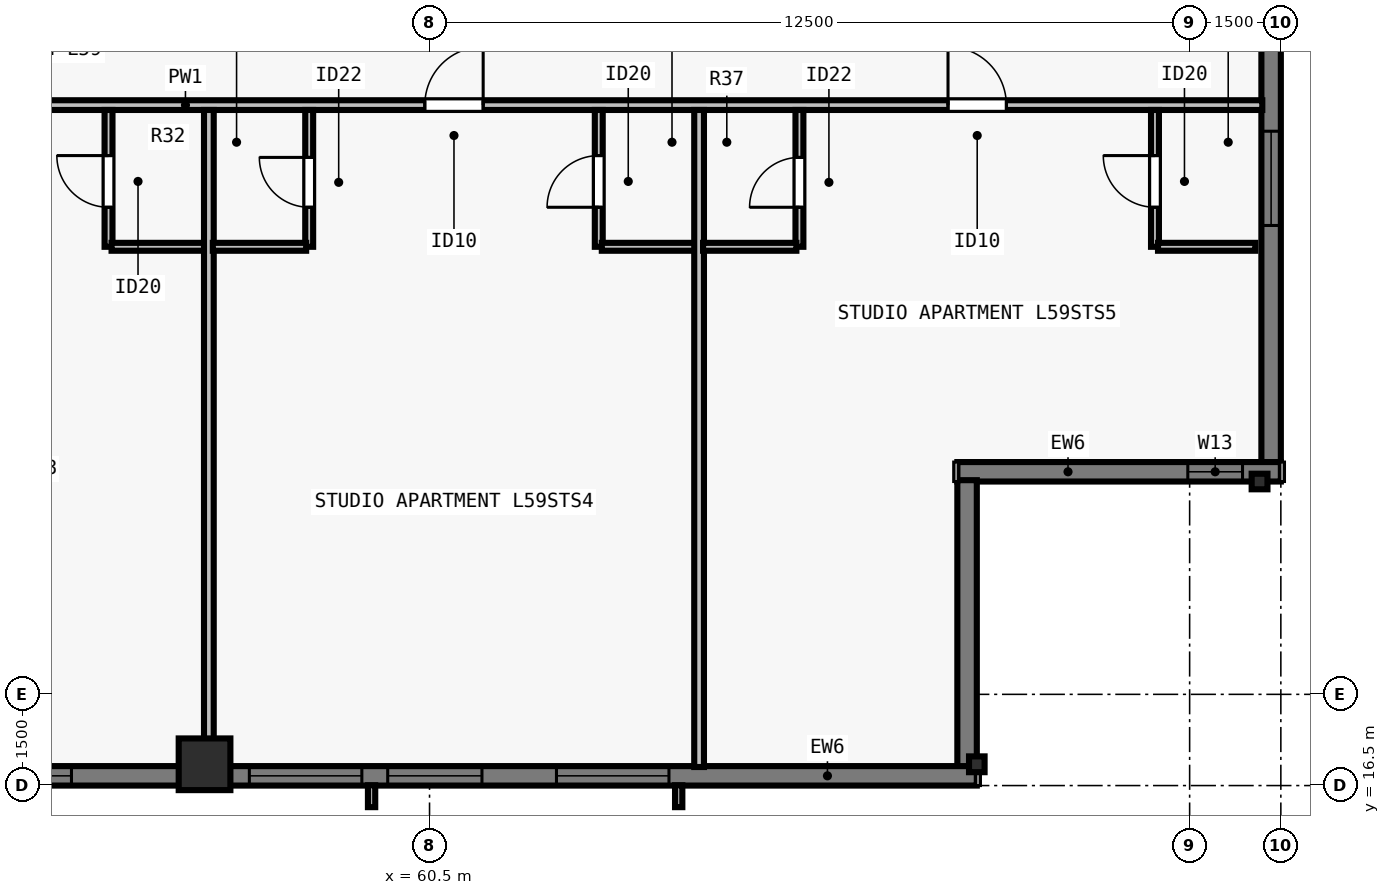
"""IFC4 building model, lengths in metres.
Left out: names, types, materials, properties, quantities, classifications, styles, units other than length and angle.
Written with IfcOpenShell. Run it as: python <this file> out.ifc"""

import sys

from ifc_helpers import new_model, si_unit, direction, frame, frame_2d, origin, origin_2d, place, context, subcontext, project, spatial, rectangle, i_section, extrude, element, fill, save


model = new_model("IFC4")
c1 = context("Model", 3, precision=1e-05, world=origin(), true_north=direction((0.0, 1.0)))
c2 = subcontext(c1, "Body", "Model", "MODEL_VIEW")
j1 = project(units=[si_unit("LENGTHUNIT", "METRE"), si_unit("PLANEANGLEUNIT", "RADIAN")], contexts=[c1])
p1 = place(None, origin())
s1 = spatial("IfcSite", under=j1, at=p1, CompositionType="ELEMENT")
p2 = place(p1, origin())
s2 = spatial("IfcBuilding", under=s1, at=p2, CompositionType="ELEMENT")
p3 = place(p2, frame((0.0, 0.0, 216.5)))
s3 = spatial("IfcBuildingStorey", under=s2, at=p3, CompositionType="ELEMENT", Elevation=216.5)
p4 = place(p3, frame((56.8, 16.85, 0.0), z_axis=(0.0, 0.0, 1.0), x_axis=(1.0, 0.0, 0.0)))
e1 = element("IfcColumn", 1, at=p4, inside=s3, PredefinedType="COLUMN", context=c2, shape_type="SweptSolid", body=[
    extrude(rectangle(XDim=0.85, YDim=0.85, at=origin_2d()), origin(), (0.0, 0.0, 1.0), 3.5),
])
for number, where, z_axis, x_axis in (
    (2, (69.5, 16.85, 0.0), (0.0, 0.0, 1.0), (1.0, 0.0, 0.0)),
    (3, (74.15, 21.5, 0.0), (0.0, 0.0, 1.0), (0.0, 1.0, 0.0)),
):
    element("IfcColumn", number, at=place(p3, frame(where, z_axis=z_axis, x_axis=x_axis)), inside=s3, PredefinedType="COLUMN", context=c2, shape_type="SweptSolid", body=[
        extrude(i_section(OverallWidth=0.256, OverallDepth=0.26, WebThickness=0.01, FlangeThickness=0.017, FilletRadius=0.013, at=origin_2d()), origin(), (0.0, 0.0, 1.0), 3.5),
    ])
p5 = place(p3, frame((74.34, 56.5, 0.0), z_axis=(0.0, 0.0, 1.0), x_axis=(0.0, -1.0, 0.0)))
e4 = element("IfcWall", 4, at=p5, inside=s3, PredefinedType="SOLIDWALL", context=c2, shape_type="SweptSolid", body=[
    extrude(rectangle(XDim=34.702, YDim=0.32, at=frame_2d((17.351, 0.0))), origin(), (0.0, 0.0, 1.0), 3.29),
])
p6 = place(p5, frame((6.888, 0.0, 0.8)))
e5 = element("IfcOpeningElement", 5, at=p6, cuts=e4, PredefinedType="OPENING", context=c2, shape_type="SweptSolid", body=[
    extrude(rectangle(XDim=1.55, YDim=1.678, at=frame_2d((0.775, 0.839))), frame((0.0, 0.17, 0.0), z_axis=(0.0, -1.0, 0.0), x_axis=(1.0, 0.0, 0.0)), (0.0, 0.0, 1.0), 0.34),
])
p7 = place(p5, frame((10.113, 0.0, 0.8)))
e6 = element("IfcOpeningElement", 6, at=p7, cuts=e4, PredefinedType="OPENING", context=c2, shape_type="SweptSolid", body=[
    extrude(rectangle(XDim=1.85, YDim=1.678, at=frame_2d((0.925, 0.839))), frame((0.0, 0.17, 0.0), z_axis=(0.0, -1.0, 0.0), x_axis=(1.0, 0.0, 0.0)), (0.0, 0.0, 1.0), 0.34),
])
p8 = place(p5, frame((14.038, 0.0, 0.8)))
e7 = element("IfcOpeningElement", 7, at=p8, cuts=e4, PredefinedType="OPENING", context=c2, shape_type="SweptSolid", body=[
    extrude(rectangle(XDim=1.55, YDim=1.678, at=frame_2d((0.775, 0.839))), frame((0.0, 0.17, 0.0), z_axis=(0.0, -1.0, 0.0), x_axis=(1.0, 0.0, 0.0)), (0.0, 0.0, 1.0), 0.34),
])
p9 = place(p5, frame((18.114, 0.0, 0.8)))
e8 = element("IfcOpeningElement", 8, at=p9, cuts=e4, PredefinedType="OPENING", context=c2, shape_type="SweptSolid", body=[
    extrude(rectangle(XDim=1.85, YDim=1.678, at=frame_2d((0.925, 0.839))), frame((0.0, 0.17, 0.0), z_axis=(0.0, -1.0, 0.0), x_axis=(1.0, 0.0, 0.0)), (0.0, 0.0, 1.0), 0.34),
])
p10 = place(p5, frame((23.614, 0.0, 0.8)))
e9 = element("IfcOpeningElement", 9, at=p10, cuts=e4, PredefinedType="OPENING", context=c2, shape_type="SweptSolid", body=[
    extrude(rectangle(XDim=1.85, YDim=1.678, at=frame_2d((0.925, 0.839))), frame((0.0, 0.17, 0.0), z_axis=(0.0, -1.0, 0.0), x_axis=(1.0, 0.0, 0.0)), (0.0, 0.0, 1.0), 0.34),
])
p11 = place(p5, frame((29.24, 0.0, 0.8)))
e10 = element("IfcOpeningElement", 10, at=p11, cuts=e4, PredefinedType="OPENING", context=c2, shape_type="SweptSolid", body=[
    extrude(rectangle(XDim=1.55, YDim=1.678, at=frame_2d((0.775, 0.839))), frame((0.0, 0.17, 0.0), z_axis=(0.0, -1.0, 0.0), x_axis=(1.0, 0.0, 0.0)), (0.0, 0.0, 1.0), 0.34),
])
p12 = place(p3, frame((74.5, 21.66, 0.0), z_axis=(0.0, 0.0, 1.0), x_axis=(-1.0, 0.0, 0.0)))
e11 = element("IfcWall", 11, at=p12, inside=s3, PredefinedType="SOLIDWALL", context=c2, shape_type="SweptSolid", body=[
    extrude(rectangle(XDim=5.32, YDim=0.32, at=frame_2d((2.66, 0.0))), origin(), (0.0, 0.0, 1.0), 3.29),
])
p13 = place(p12, frame((0.63, 0.0, 0.8)))
e12 = element("IfcOpeningElement", 12, at=p13, cuts=e11, PredefinedType="OPENING", context=c2, shape_type="SweptSolid", body=[
    extrude(rectangle(XDim=0.9, YDim=1.678, at=frame_2d((0.45, 0.839))), frame((0.0, 0.17, 0.0), z_axis=(0.0, -1.0, 0.0), x_axis=(1.0, 0.0, 0.0)), (0.0, 0.0, 1.0), 0.34),
])
p14 = place(p3, frame((69.34, 21.522, 0.0), z_axis=(0.0, 0.0, 1.0), x_axis=(0.0, -1.0, 0.0)))
e13 = element("IfcWall", 13, at=p14, inside=s3, PredefinedType="SOLIDWALL", context=c2, shape_type="SweptSolid", body=[
    extrude(rectangle(XDim=4.724, YDim=0.32, at=frame_2d((2.362, 0.0))), origin(), (0.0, 0.0, 1.0), 3.29),
])
p15 = place(p3, frame((69.5, 16.66, 0.0), z_axis=(0.0, 0.0, 1.0), x_axis=(-1.0, 0.0, 0.0)))
e14 = element("IfcWall", 14, at=p15, inside=s3, PredefinedType="SOLIDWALL", context=c2, shape_type="SweptSolid", body=[
    extrude(rectangle(XDim=34.702, YDim=0.32, at=frame_2d((17.351, 0.0))), origin(), (0.0, 0.0, 1.0), 3.29),
])
p16 = place(p15, frame((5.062, 0.0, 0.8)))
e15 = element("IfcOpeningElement", 15, at=p16, cuts=e14, PredefinedType="OPENING", context=c2, shape_type="SweptSolid", body=[
    extrude(rectangle(XDim=1.85, YDim=1.678, at=frame_2d((0.925, 0.839))), frame((0.0, 0.17, 0.0), z_axis=(0.0, -1.0, 0.0), x_axis=(1.0, 0.0, 0.0)), (0.0, 0.0, 1.0), 0.34),
])
p17 = place(p15, frame((8.138, 0.0, 0.8)))
e16 = element("IfcOpeningElement", 16, at=p17, cuts=e14, PredefinedType="OPENING", context=c2, shape_type="SweptSolid", body=[
    extrude(rectangle(XDim=1.55, YDim=1.678, at=frame_2d((0.775, 0.839))), frame((0.0, 0.17, 0.0), z_axis=(0.0, -1.0, 0.0), x_axis=(1.0, 0.0, 0.0)), (0.0, 0.0, 1.0), 0.34),
])
p18 = place(p15, frame((10.113, 0.0, 0.8)))
e17 = element("IfcOpeningElement", 17, at=p18, cuts=e14, PredefinedType="OPENING", context=c2, shape_type="SweptSolid", body=[
    extrude(rectangle(XDim=1.85, YDim=1.678, at=frame_2d((0.925, 0.839))), frame((0.0, 0.17, 0.0), z_axis=(0.0, -1.0, 0.0), x_axis=(1.0, 0.0, 0.0)), (0.0, 0.0, 1.0), 0.34),
])
p19 = place(p15, frame((14.888, 0.0, 0.8)))
e18 = element("IfcOpeningElement", 18, at=p19, cuts=e14, PredefinedType="OPENING", context=c2, shape_type="SweptSolid", body=[
    extrude(rectangle(XDim=1.55, YDim=1.678, at=frame_2d((0.775, 0.839))), frame((0.0, 0.17, 0.0), z_axis=(0.0, -1.0, 0.0), x_axis=(1.0, 0.0, 0.0)), (0.0, 0.0, 1.0), 0.34),
])
p20 = place(p15, frame((18.114, 0.0, 0.8)))
e19 = element("IfcOpeningElement", 19, at=p20, cuts=e14, PredefinedType="OPENING", context=c2, shape_type="SweptSolid", body=[
    extrude(rectangle(XDim=1.85, YDim=1.678, at=frame_2d((0.925, 0.839))), frame((0.0, 0.17, 0.0), z_axis=(0.0, -1.0, 0.0), x_axis=(1.0, 0.0, 0.0)), (0.0, 0.0, 1.0), 0.34),
])
p21 = place(p15, frame((24.864, 0.0, 0.8)))
e20 = element("IfcOpeningElement", 20, at=p21, cuts=e14, PredefinedType="OPENING", context=c2, shape_type="SweptSolid", body=[
    extrude(rectangle(XDim=1.85, YDim=1.678, at=frame_2d((0.925, 0.839))), frame((0.0, 0.17, 0.0), z_axis=(0.0, -1.0, 0.0), x_axis=(1.0, 0.0, 0.0)), (0.0, 0.0, 1.0), 0.34),
])
p22 = place(p15, frame((28.389, 0.0, 0.8)))
e21 = element("IfcOpeningElement", 21, at=p22, cuts=e14, PredefinedType="OPENING", context=c2, shape_type="SweptSolid", body=[
    extrude(rectangle(XDim=1.55, YDim=1.678, at=frame_2d((0.775, 0.839))), frame((0.0, 0.17, 0.0), z_axis=(0.0, -1.0, 0.0), x_axis=(1.0, 0.0, 0.0)), (0.0, 0.0, 1.0), 0.34),
])
p23 = place(p15, frame((30.71, 0.0, 0.8)))
e22 = element("IfcOpeningElement", 22, at=p23, cuts=e14, PredefinedType="OPENING", context=c2, shape_type="SweptSolid", body=[
    extrude(rectangle(XDim=0.9, YDim=1.678, at=frame_2d((0.45, 0.839))), frame((0.0, 0.17, 0.0), z_axis=(0.0, -1.0, 0.0), x_axis=(1.0, 0.0, 0.0)), (0.0, 0.0, 1.0), 0.34),
])
p24 = place(p3, frame((29.805, 27.69, 0.0), z_axis=(0.0, 0.0, 1.0), x_axis=(1.0, 0.0, 0.0)))
e23 = element("IfcWall", 23, at=p24, inside=s3, PredefinedType="PARTITIONING", context=c2, shape_type="SweptSolid", body=[
    extrude(rectangle(XDim=44.39, YDim=0.16, at=frame_2d((22.195, 0.0))), origin(), (0.0, 0.0, 1.0), 2.958),
])
p25 = place(p24, frame((4.279, 0.0, 0.0)))
e24 = element("IfcOpeningElement", 24, at=p25, cuts=e23, PredefinedType="OPENING", context=c2, shape_type="SweptSolid", body=[
    extrude(rectangle(XDim=0.96, YDim=2.18, at=frame_2d((0.48, 1.09))), frame((0.0, 0.09, 0.0), z_axis=(0.0, -1.0, 0.0), x_axis=(1.0, 0.0, 0.0)), (0.0, 0.0, 1.0), 0.18),
])
p26 = place(p24, frame((12.953, 0.0, 0.0)))
e25 = element("IfcOpeningElement", 25, at=p26, cuts=e23, PredefinedType="OPENING", context=c2, shape_type="SweptSolid", body=[
    extrude(rectangle(XDim=0.96, YDim=2.18, at=frame_2d((0.48, 1.09))), frame((0.0, 0.09, 0.0), z_axis=(0.0, -1.0, 0.0), x_axis=(1.0, 0.0, 0.0)), (0.0, 0.0, 1.0), 0.18),
])
p27 = place(p24, frame((21.785, 0.0, 0.0)))
e26 = element("IfcOpeningElement", 26, at=p27, cuts=e23, PredefinedType="OPENING", context=c2, shape_type="SweptSolid", body=[
    extrude(rectangle(XDim=0.96, YDim=2.18, at=frame_2d((0.48, 1.09))), frame((0.0, 0.09, 0.0), z_axis=(0.0, -1.0, 0.0), x_axis=(1.0, 0.0, 0.0)), (0.0, 0.0, 1.0), 0.18),
])
p28 = place(p24, frame((30.617, 0.0, 0.0)))
e27 = element("IfcOpeningElement", 27, at=p28, cuts=e23, PredefinedType="OPENING", context=c2, shape_type="SweptSolid", body=[
    extrude(rectangle(XDim=0.96, YDim=2.18, at=frame_2d((0.48, 1.09))), frame((0.0, 0.09, 0.0), z_axis=(0.0, -1.0, 0.0), x_axis=(1.0, 0.0, 0.0)), (0.0, 0.0, 1.0), 0.18),
])
p29 = place(p24, frame((39.221, 0.0, 0.0)))
e28 = element("IfcOpeningElement", 28, at=p29, cuts=e23, PredefinedType="OPENING", context=c2, shape_type="SweptSolid", body=[
    extrude(rectangle(XDim=0.96, YDim=2.18, at=frame_2d((0.48, 1.09))), frame((0.0, 0.09, 0.0), z_axis=(0.0, -1.0, 0.0), x_axis=(1.0, 0.0, 0.0)), (0.0, 0.0, 1.0), 0.18),
])
p30 = place(p3, frame((55.221, 25.36, 0.0), z_axis=(0.0, 0.0, 1.0), x_axis=(0.0, 1.0, 0.0)))
e29 = element("IfcWall", 29, at=p30, inside=s3, PredefinedType="PLUMBINGWALL", context=c2, shape_type="SweptSolid", body=[
    extrude(rectangle(XDim=2.25, YDim=0.13, at=frame_2d((1.125, 0.0))), origin(), (0.0, 0.0, 1.0), 3.29),
])
p31 = place(p30, frame((0.65, 0.0, 0.0)))
e30 = element("IfcOpeningElement", 30, at=p31, cuts=e29, PredefinedType="OPENING", context=c2, shape_type="SweptSolid", body=[
    extrude(rectangle(XDim=0.85, YDim=2.1, at=frame_2d((0.425, 1.05))), frame((0.0, 0.075, 0.0), z_axis=(0.0, -1.0, 0.0), x_axis=(1.0, 0.0, 0.0)), (0.0, 0.0, 1.0), 0.15),
])
p32 = place(p3, frame((55.271, 25.36, 0.0), z_axis=(0.0, 0.0, 1.0), x_axis=(1.0, 0.0, 0.0)))
e31 = element("IfcWall", 31, at=p32, inside=s3, PredefinedType="PLUMBINGWALL", context=c2, shape_type="SweptSolid", body=[
    extrude(rectangle(XDim=1.6, YDim=0.13, at=frame_2d((0.8, 0.0))), origin(), (0.0, 0.0, 1.0), 3.29),
])
p33 = place(p3, frame((56.871, 16.805, 0.0), z_axis=(0.0, 0.0, 1.0), x_axis=(0.0, 1.0, 0.0)))
e32 = element("IfcWall", 32, at=p33, inside=s3, PredefinedType="PARTITIONING", context=c2, shape_type="SweptSolid", body=[
    extrude(rectangle(XDim=10.805, YDim=0.16, at=frame_2d((5.403, 0.0))), origin(), (0.0, 0.0, 1.0), 2.573),
])
p34 = place(p3, frame((58.521, 25.36, 0.0), z_axis=(0.0, 0.0, 1.0), x_axis=(0.0, 1.0, 0.0)))
e33 = element("IfcWall", 33, at=p34, inside=s3, PredefinedType="PLUMBINGWALL", context=c2, shape_type="SweptSolid", body=[
    extrude(rectangle(XDim=2.25, YDim=0.13, at=frame_2d((1.125, 0.0))), origin(), (0.0, 0.0, 1.0), 3.29),
])
p35 = place(p34, frame((0.65, 0.0, 0.0)))
e34 = element("IfcOpeningElement", 34, at=p35, cuts=e33, PredefinedType="OPENING", context=c2, shape_type="SweptSolid", body=[
    extrude(rectangle(XDim=0.82, YDim=2.1, at=frame_2d((0.41, 1.05))), frame((0.0, 0.075, 0.0), z_axis=(0.0, -1.0, 0.0), x_axis=(1.0, 0.0, 0.0)), (0.0, 0.0, 1.0), 0.15),
])
p36 = place(p3, frame((56.936, 25.36, 0.0), z_axis=(0.0, 0.0, 1.0), x_axis=(1.0, 0.0, 0.0)))
e35 = element("IfcWall", 35, at=p36, inside=s3, PredefinedType="PLUMBINGWALL", context=c2, shape_type="SweptSolid", body=[
    extrude(rectangle(XDim=1.535, YDim=0.13, at=frame_2d((0.768, 0.0))), origin(), (0.0, 0.0, 1.0), 3.29),
])
p37 = place(p3, frame((63.283, 25.36, 0.0), z_axis=(0.0, 0.0, 1.0), x_axis=(0.0, 1.0, 0.0)))
e36 = element("IfcWall", 36, at=p37, inside=s3, PredefinedType="PLUMBINGWALL", context=c2, shape_type="SweptSolid", body=[
    extrude(rectangle(XDim=2.25, YDim=0.13, at=frame_2d((1.125, 0.0))), origin(), (0.0, 0.0, 1.0), 2.573),
])
p38 = place(p37, frame((0.65, 0.0, 0.0)))
e37 = element("IfcOpeningElement", 37, at=p38, cuts=e36, PredefinedType="OPENING", context=c2, shape_type="SweptSolid", body=[
    extrude(rectangle(XDim=0.85, YDim=2.1, at=frame_2d((0.425, 1.05))), frame((0.0, 0.075, 0.0), z_axis=(0.0, -1.0, 0.0), x_axis=(1.0, 0.0, 0.0)), (0.0, 0.0, 1.0), 0.15),
])
p39 = place(p3, frame((63.333, 25.36, 0.0), z_axis=(0.0, 0.0, 1.0), x_axis=(1.0, 0.0, 0.0)))
e38 = element("IfcWall", 38, at=p39, inside=s3, PredefinedType="PLUMBINGWALL", context=c2, shape_type="SweptSolid", body=[
    extrude(rectangle(XDim=1.6, YDim=0.13, at=frame_2d((0.8, 0.0))), origin(), (0.0, 0.0, 1.0), 3.29),
])
p40 = place(p3, frame((64.933, 16.805, 0.0), z_axis=(0.0, 0.0, 1.0), x_axis=(0.0, 1.0, 0.0)))
e39 = element("IfcWall", 39, at=p40, inside=s3, PredefinedType="PARTITIONING", context=c2, shape_type="SweptSolid", body=[
    extrude(rectangle(XDim=10.805, YDim=0.16, at=frame_2d((5.403, 0.0))), origin(), (0.0, 0.0, 1.0), 2.573),
])
p41 = place(p3, frame((66.583, 25.36, 0.0), z_axis=(0.0, 0.0, 1.0), x_axis=(0.0, 1.0, 0.0)))
e40 = element("IfcWall", 40, at=p41, inside=s3, PredefinedType="PLUMBINGWALL", context=c2, shape_type="SweptSolid", body=[
    extrude(rectangle(XDim=2.25, YDim=0.13, at=frame_2d((1.125, 0.0))), origin(), (0.0, 0.0, 1.0), 3.29),
])
p42 = place(p41, frame((0.65, 0.0, 0.0)))
e41 = element("IfcOpeningElement", 41, at=p42, cuts=e40, PredefinedType="OPENING", context=c2, shape_type="SweptSolid", body=[
    extrude(rectangle(XDim=0.82, YDim=2.1, at=frame_2d((0.41, 1.05))), frame((0.0, 0.075, 0.0), z_axis=(0.0, -1.0, 0.0), x_axis=(1.0, 0.0, 0.0)), (0.0, 0.0, 1.0), 0.15),
])
p43 = place(p3, frame((64.998, 25.36, 0.0), z_axis=(0.0, 0.0, 1.0), x_axis=(1.0, 0.0, 0.0)))
e42 = element("IfcWall", 42, at=p43, inside=s3, PredefinedType="PLUMBINGWALL", context=c2, shape_type="SweptSolid", body=[
    extrude(rectangle(XDim=1.535, YDim=0.13, at=frame_2d((0.768, 0.0))), origin(), (0.0, 0.0, 1.0), 3.29),
])
p44 = place(p3, frame((72.43, 25.36, 0.0), z_axis=(0.0, 0.0, 1.0), x_axis=(0.0, 1.0, 0.0)))
e43 = element("IfcWall", 43, at=p44, inside=s3, PredefinedType="PLUMBINGWALL", context=c2, shape_type="SweptSolid", body=[
    extrude(rectangle(XDim=2.25, YDim=0.13, at=frame_2d((1.125, 0.0))), origin(), (0.0, 0.0, 1.0), 3.29),
])
p45 = place(p44, frame((0.65, 0.0, 0.0)))
e44 = element("IfcOpeningElement", 44, at=p45, cuts=e43, PredefinedType="OPENING", context=c2, shape_type="SweptSolid", body=[
    extrude(rectangle(XDim=0.85, YDim=2.1, at=frame_2d((0.425, 1.05))), frame((0.0, 0.075, 0.0), z_axis=(0.0, -1.0, 0.0), x_axis=(1.0, 0.0, 0.0)), (0.0, 0.0, 1.0), 0.15),
])
p46 = place(p3, frame((72.48, 25.36, 0.0), z_axis=(0.0, 0.0, 1.0), x_axis=(1.0, 0.0, 0.0)))
e45 = element("IfcWall", 45, at=p46, inside=s3, PredefinedType="PLUMBINGWALL", context=c2, shape_type="SweptSolid", body=[
    extrude(rectangle(XDim=1.6, YDim=0.13, at=frame_2d((0.8, 0.0))), origin(), (0.0, 0.0, 1.0), 3.29),
])
p47 = place(p11, origin())
e46 = element("IfcWindow", 46, at=p47, inside=s3, PartitioningType="SINGLE_PANEL", PredefinedType="WINDOW", context=c2, shape_type="SweptSolid", body=[
    extrude(rectangle(XDim=1.55, YDim=1.678, at=frame_2d((0.775, 0.839))), frame((0.0, -0.05, 0.0), z_axis=(0.0, -1.0, 0.0), x_axis=(1.0, 0.0, 0.0)), (0.0, 0.0, 1.0), 0.06),
])
fill(e10, e46)
p48 = place(p16, origin())
e47 = element("IfcWindow", 47, at=p48, inside=s3, PartitioningType="SINGLE_PANEL", PredefinedType="WINDOW", context=c2, shape_type="SweptSolid", body=[
    extrude(rectangle(XDim=1.85, YDim=1.678, at=frame_2d((0.925, 0.839))), frame((0.0, -0.05, 0.0), z_axis=(0.0, -1.0, 0.0), x_axis=(1.0, 0.0, 0.0)), (0.0, 0.0, 1.0), 0.06),
])
fill(e15, e47)
p49 = place(p17, origin())
e48 = element("IfcWindow", 48, at=p49, inside=s3, PartitioningType="SINGLE_PANEL", PredefinedType="WINDOW", context=c2, shape_type="SweptSolid", body=[
    extrude(rectangle(XDim=1.55, YDim=1.678, at=frame_2d((0.775, 0.839))), frame((0.0, -0.05, 0.0), z_axis=(0.0, -1.0, 0.0), x_axis=(1.0, 0.0, 0.0)), (0.0, 0.0, 1.0), 0.06),
])
fill(e16, e48)
p50 = place(p18, origin())
e49 = element("IfcWindow", 49, at=p50, inside=s3, PartitioningType="SINGLE_PANEL", PredefinedType="WINDOW", context=c2, shape_type="SweptSolid", body=[
    extrude(rectangle(XDim=1.85, YDim=1.678, at=frame_2d((0.925, 0.839))), frame((0.0, -0.05, 0.0), z_axis=(0.0, -1.0, 0.0), x_axis=(1.0, 0.0, 0.0)), (0.0, 0.0, 1.0), 0.06),
])
fill(e17, e49)
p51 = place(p19, origin())
e50 = element("IfcWindow", 50, at=p51, inside=s3, PartitioningType="SINGLE_PANEL", PredefinedType="WINDOW", context=c2, shape_type="SweptSolid", body=[
    extrude(rectangle(XDim=1.55, YDim=1.678, at=frame_2d((0.775, 0.839))), frame((0.0, -0.05, 0.0), z_axis=(0.0, -1.0, 0.0), x_axis=(1.0, 0.0, 0.0)), (0.0, 0.0, 1.0), 0.06),
])
fill(e18, e50)
p52 = place(p13, origin())
e51 = element("IfcWindow", 51, at=p52, inside=s3, PartitioningType="SINGLE_PANEL", PredefinedType="WINDOW", context=c2, shape_type="SweptSolid", body=[
    extrude(rectangle(XDim=0.9, YDim=1.678, at=frame_2d((0.45, 0.839))), frame((0.0, -0.04, 0.0), z_axis=(0.0, -1.0, 0.0), x_axis=(1.0, 0.0, 0.0)), (0.0, 0.0, 1.0), 0.06),
])
fill(e12, e51)
p53 = place(p31, origin())
e52 = element("IfcDoor", 52, at=p53, inside=s3, OperationType="SINGLE_SWING_RIGHT", PredefinedType="DOOR", context=c2, shape_type="SweptSolid", body=[
    extrude(rectangle(XDim=0.85, YDim=2.1, at=frame_2d((0.425, 1.05))), frame((0.0, 0.025, 0.0), z_axis=(0.0, -1.0, 0.0), x_axis=(1.0, 0.0, 0.0)), (0.0, 0.0, 1.0), 0.05),
])
fill(e30, e52)
p54 = place(p35, origin())
e53 = element("IfcDoor", 53, at=p54, inside=s3, OperationType="SINGLE_SWING_RIGHT", PredefinedType="DOOR", context=c2, shape_type="SweptSolid", body=[
    extrude(rectangle(XDim=0.82, YDim=2.1, at=frame_2d((0.41, 1.05))), frame((0.0, 0.025, 0.0), z_axis=(0.0, -1.0, 0.0), x_axis=(1.0, 0.0, 0.0)), (0.0, 0.0, 1.0), 0.05),
])
fill(e34, e53)
p55 = place(p38, origin())
e54 = element("IfcDoor", 54, at=p55, inside=s3, OperationType="SINGLE_SWING_LEFT", PredefinedType="DOOR", context=c2, shape_type="SweptSolid", body=[
    extrude(rectangle(XDim=0.85, YDim=2.1, at=frame_2d((0.425, 1.05))), frame((0.0, 0.025, 0.0), z_axis=(0.0, -1.0, 0.0), x_axis=(1.0, 0.0, 0.0)), (0.0, 0.0, 1.0), 0.05),
])
fill(e37, e54)
p56 = place(p28, origin())
e55 = element("IfcDoor", 55, at=p56, inside=s3, OperationType="SINGLE_SWING_RIGHT", PredefinedType="DOOR", context=c2, shape_type="SweptSolid", body=[
    extrude(rectangle(XDim=0.96, YDim=2.18, at=frame_2d((0.48, 1.09))), frame((0.0, 0.025, 0.0), z_axis=(0.0, -1.0, 0.0), x_axis=(1.0, 0.0, 0.0)), (0.0, 0.0, 1.0), 0.05),
])
fill(e27, e55)
p57 = place(p42, origin())
e56 = element("IfcDoor", 56, at=p57, inside=s3, OperationType="SINGLE_SWING_LEFT", PredefinedType="DOOR", context=c2, shape_type="SweptSolid", body=[
    extrude(rectangle(XDim=0.82, YDim=2.1, at=frame_2d((0.41, 1.05))), frame((0.0, 0.025, 0.0), z_axis=(0.0, -1.0, 0.0), x_axis=(1.0, 0.0, 0.0)), (0.0, 0.0, 1.0), 0.05),
])
fill(e41, e56)
p58 = place(p45, origin())
e57 = element("IfcDoor", 57, at=p58, inside=s3, OperationType="SINGLE_SWING_RIGHT", PredefinedType="DOOR", context=c2, shape_type="SweptSolid", body=[
    extrude(rectangle(XDim=0.85, YDim=2.1, at=frame_2d((0.425, 1.05))), frame((0.0, 0.025, 0.0), z_axis=(0.0, -1.0, 0.0), x_axis=(1.0, 0.0, 0.0)), (0.0, 0.0, 1.0), 0.05),
])
fill(e44, e57)
p59 = place(p29, origin())
e58 = element("IfcDoor", 58, at=p59, inside=s3, OperationType="SINGLE_SWING_LEFT", PredefinedType="DOOR", context=c2, shape_type="SweptSolid", body=[
    extrude(rectangle(XDim=0.96, YDim=2.18, at=frame_2d((0.48, 1.09))), frame((0.0, 0.025, 0.0), z_axis=(0.0, -1.0, 0.0), x_axis=(1.0, 0.0, 0.0)), (0.0, 0.0, 1.0), 0.05),
])
fill(e28, e58)
save(model, sys.argv[1])
